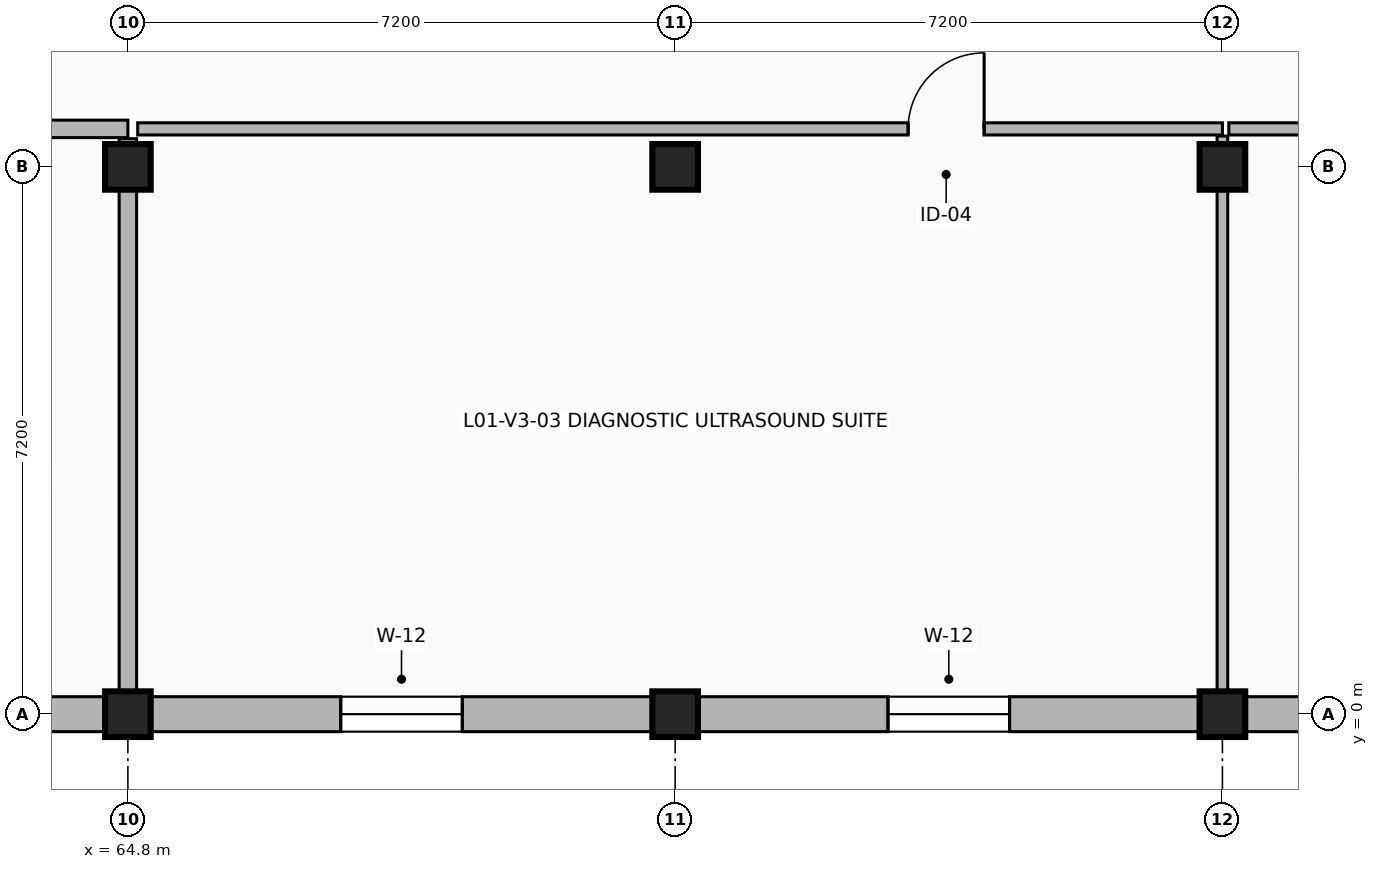
"""IFC4 building model, lengths in metres.
Left out: names, types, materials, properties, quantities, classifications, styles, units other than length and angle.
Written with IfcOpenShell. Run it as: python <this file> out.ifc"""

import sys

from ifc_helpers import new_model, si_unit, direction, frame, frame_2d, origin, origin_2d, place, context, subcontext, project, spatial, rectangle, extrude, element, fill, save


model = new_model("IFC4")
c1 = context("Model", 3, precision=1e-05, world=origin(), true_north=direction((0.0, 1.0)))
c2 = subcontext(c1, "Body", "Model", "MODEL_VIEW")
j1 = project(units=[si_unit("LENGTHUNIT", "METRE"), si_unit("PLANEANGLEUNIT", "RADIAN")], contexts=[c1])
p1 = place(None, origin())
s1 = spatial("IfcSite", under=j1, at=p1, CompositionType="ELEMENT")
p2 = place(p1, origin())
s2 = spatial("IfcBuilding", under=s1, at=p2, CompositionType="ELEMENT")
p3 = place(p2, frame((0.0, 0.0, 4.5)))
s3 = spatial("IfcBuildingStorey", under=s2, at=p3, CompositionType="ELEMENT", Elevation=4.5)
for number, where, z_axis, x_axis in (
    (1, (64.8, 0.0, 0.0), (0.0, 0.0, 1.0), (1.0, 0.0, 0.0)),
    (2, (64.8, 7.2, 0.0), (0.0, 0.0, 1.0), (1.0, 0.0, 0.0)),
    (3, (72.0, 0.0, 0.0), (0.0, 0.0, 1.0), (1.0, 0.0, 0.0)),
    (4, (72.0, 7.2, 0.0), (0.0, 0.0, 1.0), (1.0, 0.0, 0.0)),
    (5, (79.2, 0.0, 0.0), (0.0, 0.0, 1.0), (1.0, 0.0, 0.0)),
    (6, (79.2, 7.2, 0.0), (0.0, 0.0, 1.0), (1.0, 0.0, 0.0)),
):
    element("IfcColumn", number, at=place(p3, frame(where, z_axis=z_axis, x_axis=x_axis)), inside=s3, PredefinedType="COLUMN", context=c2, shape_type="SweptSolid", body=[
        extrude(rectangle(XDim=0.6, YDim=0.6, at=origin_2d()), origin(), (0.0, 0.0, 1.0), 3.55),
    ])
p4 = place(p3, frame((57.6, 0.0, 0.0), z_axis=(0.0, 0.0, 1.0), x_axis=(1.0, 0.0, 0.0)))
e7 = element("IfcWall", 7, at=p4, inside=s3, PredefinedType="SOLIDWALL", context=c2, shape_type="SweptSolid", body=[
    extrude(rectangle(XDim=7.2, YDim=0.46, at=frame_2d((3.6, 0.0))), origin(), (0.0, 0.0, 1.0), 2.83),
])
p5 = place(p4, frame((2.8, 0.0, 1.2)))
e8 = element("IfcOpeningElement", 8, at=p5, cuts=e7, PredefinedType="OPENING", context=c2, shape_type="SweptSolid", body=[
    extrude(rectangle(XDim=1.6, YDim=1.4, at=frame_2d((0.8, 0.7))), frame((0.0, 0.24, 0.0), z_axis=(0.0, -1.0, 0.0), x_axis=(1.0, 0.0, 0.0)), (0.0, 0.0, 1.0), 0.48),
])
p6 = place(p3, frame((64.8, 0.0, 0.0), z_axis=(0.0, 0.0, 1.0), x_axis=(1.0, 0.0, 0.0)))
e9 = element("IfcWall", 9, at=p6, inside=s3, PredefinedType="SOLIDWALL", context=c2, shape_type="SweptSolid", body=[
    extrude(rectangle(XDim=7.2, YDim=0.46, at=frame_2d((3.6, 0.0))), origin(), (0.0, 0.0, 1.0), 2.83),
])
p7 = place(p6, frame((2.8, 0.0, 1.2)))
e10 = element("IfcOpeningElement", 10, at=p7, cuts=e9, PredefinedType="OPENING", context=c2, shape_type="SweptSolid", body=[
    extrude(rectangle(XDim=1.6, YDim=1.4, at=frame_2d((0.8, 0.7))), frame((0.0, 0.24, 0.0), z_axis=(0.0, -1.0, 0.0), x_axis=(1.0, 0.0, 0.0)), (0.0, 0.0, 1.0), 0.48),
])
p8 = place(p3, frame((72.0, 0.0, 0.0), z_axis=(0.0, 0.0, 1.0), x_axis=(1.0, 0.0, 0.0)))
e11 = element("IfcWall", 11, at=p8, inside=s3, PredefinedType="SOLIDWALL", context=c2, shape_type="SweptSolid", body=[
    extrude(rectangle(XDim=7.2, YDim=0.46, at=frame_2d((3.6, 0.0))), origin(), (0.0, 0.0, 1.0), 2.83),
])
p9 = place(p8, frame((2.8, 0.0, 1.2)))
e12 = element("IfcOpeningElement", 12, at=p9, cuts=e11, PredefinedType="OPENING", context=c2, shape_type="SweptSolid", body=[
    extrude(rectangle(XDim=1.6, YDim=1.4, at=frame_2d((0.8, 0.7))), frame((0.0, 0.24, 0.0), z_axis=(0.0, -1.0, 0.0), x_axis=(1.0, 0.0, 0.0)), (0.0, 0.0, 1.0), 0.48),
])
p10 = place(p3, frame((79.2, 0.0, 0.0), z_axis=(0.0, 0.0, 1.0), x_axis=(1.0, 0.0, 0.0)))
e13 = element("IfcWall", 13, at=p10, inside=s3, PredefinedType="SOLIDWALL", context=c2, shape_type="SweptSolid", body=[
    extrude(rectangle(XDim=7.2, YDim=0.46, at=frame_2d((3.6, 0.0))), origin(), (0.0, 0.0, 1.0), 2.83),
])
p11 = place(p10, frame((2.8, 0.0, 1.2)))
e14 = element("IfcOpeningElement", 14, at=p11, cuts=e13, PredefinedType="OPENING", context=c2, shape_type="SweptSolid", body=[
    extrude(rectangle(XDim=1.6, YDim=1.4, at=frame_2d((0.8, 0.7))), frame((0.0, 0.24, 0.0), z_axis=(0.0, -1.0, 0.0), x_axis=(1.0, 0.0, 0.0)), (0.0, 0.0, 1.0), 0.48),
])
p12 = place(p3, frame((57.845, 7.7, 0.0), z_axis=(0.0, 0.0, 1.0), x_axis=(1.0, 0.0, 0.0)))
e15 = element("IfcWall", 15, at=p12, inside=s3, PredefinedType="PARTITIONING", context=c2, shape_type="SweptSolid", body=[
    extrude(rectangle(XDim=6.955, YDim=0.23, at=frame_2d((3.478, 0.0))), origin(), (0.0, 0.0, 1.0), 2.81),
])
p13 = place(p12, frame((2.562, 0.0, 0.0)))
e16 = element("IfcOpeningElement", 16, at=p13, cuts=e15, PredefinedType="OPENING", context=c2, shape_type="SweptSolid", body=[
    extrude(rectangle(XDim=1.6, YDim=2.3, at=frame_2d((0.8, 1.15))), frame((0.0, 0.125, 0.0), z_axis=(0.0, -1.0, 0.0), x_axis=(1.0, 0.0, 0.0)), (0.0, 0.0, 1.0), 0.25),
])
p14 = place(p3, frame((64.8, 7.571, 0.0), z_axis=(0.0, 0.0, 1.0), x_axis=(0.0, -1.0, 0.0)))
e17 = element("IfcWall", 17, at=p14, inside=s3, PredefinedType="PARTITIONING", context=c2, shape_type="SweptSolid", body=[
    extrude(rectangle(XDim=7.326, YDim=0.23, at=frame_2d((3.663, 0.0))), origin(), (0.0, 0.0, 1.0), 2.81),
])
p15 = place(p3, frame((64.929, 7.7, 0.0), z_axis=(0.0, 0.0, 1.0), x_axis=(1.0, 0.0, 0.0)))
e18 = element("IfcWall", 18, at=p15, inside=s3, PredefinedType="PARTITIONING", context=c2, shape_type="SweptSolid", body=[
    extrude(rectangle(XDim=14.271, YDim=0.16, at=frame_2d((7.135, 0.0))), origin(), (0.0, 0.0, 1.0), 2.81),
])
p16 = place(p15, frame((10.136, 0.0, 0.0)))
e19 = element("IfcOpeningElement", 19, at=p16, cuts=e18, PredefinedType="OPENING", context=c2, shape_type="SweptSolid", body=[
    extrude(rectangle(XDim=1.0, YDim=2.15, at=frame_2d((0.5, 1.075))), frame((0.0, 0.09, 0.0), z_axis=(0.0, -1.0, 0.0), x_axis=(1.0, 0.0, 0.0)), (0.0, 0.0, 1.0), 0.18),
])
p17 = place(p3, frame((79.2, 7.606, 0.0), z_axis=(0.0, 0.0, 1.0), x_axis=(0.0, -1.0, 0.0)))
e20 = element("IfcWall", 20, at=p17, inside=s3, PredefinedType="PARTITIONING", context=c2, shape_type="SweptSolid", body=[
    extrude(rectangle(XDim=7.361, YDim=0.14, at=frame_2d((3.68, 0.0))), origin(), (0.0, 0.0, 1.0), 2.81),
])
p18 = place(p3, frame((79.284, 7.7, 0.0), z_axis=(0.0, 0.0, 1.0), x_axis=(1.0, 0.0, 0.0)))
e21 = element("IfcWall", 21, at=p18, inside=s3, PredefinedType="PARTITIONING", context=c2, shape_type="SweptSolid", body=[
    extrude(rectangle(XDim=7.116, YDim=0.16, at=frame_2d((3.558, 0.0))), origin(), (0.0, 0.0, 1.0), 2.81),
])
p19 = place(p18, frame((3.033, 0.0, 0.0)))
e22 = element("IfcOpeningElement", 22, at=p19, cuts=e21, PredefinedType="OPENING", context=c2, shape_type="SweptSolid", body=[
    extrude(rectangle(XDim=1.05, YDim=2.15, at=frame_2d((0.525, 1.075))), frame((0.0, 0.09, 0.0), z_axis=(0.0, -1.0, 0.0), x_axis=(1.0, 0.0, 0.0)), (0.0, 0.0, 1.0), 0.18),
])
p20 = place(p7, origin())
e23 = element("IfcWindow", 23, at=p20, inside=s3, PartitioningType="SINGLE_PANEL", PredefinedType="WINDOW", context=c2, shape_type="SweptSolid", body=[
    extrude(rectangle(XDim=1.6, YDim=1.4, at=frame_2d((0.8, 0.7))), frame((0.0, 0.03, 0.0), z_axis=(0.0, -1.0, 0.0), x_axis=(1.0, 0.0, 0.0)), (0.0, 0.0, 1.0), 0.06),
])
fill(e10, e23)
p21 = place(p9, origin())
e24 = element("IfcWindow", 24, at=p21, inside=s3, PartitioningType="SINGLE_PANEL", PredefinedType="WINDOW", context=c2, shape_type="SweptSolid", body=[
    extrude(rectangle(XDim=1.6, YDim=1.4, at=frame_2d((0.8, 0.7))), frame((0.0, 0.03, 0.0), z_axis=(0.0, -1.0, 0.0), x_axis=(1.0, 0.0, 0.0)), (0.0, 0.0, 1.0), 0.06),
])
fill(e12, e24)
p22 = place(p16, origin())
e25 = element("IfcDoor", 25, at=p22, inside=s3, OperationType="SINGLE_SWING_RIGHT", PredefinedType="DOOR", context=c2, shape_type="SweptSolid", body=[
    extrude(rectangle(XDim=1.0, YDim=2.15, at=frame_2d((0.5, 1.075))), frame((0.0, 0.025, 0.0), z_axis=(0.0, -1.0, 0.0), x_axis=(1.0, 0.0, 0.0)), (0.0, 0.0, 1.0), 0.05),
])
fill(e19, e25)
save(model, sys.argv[1])
